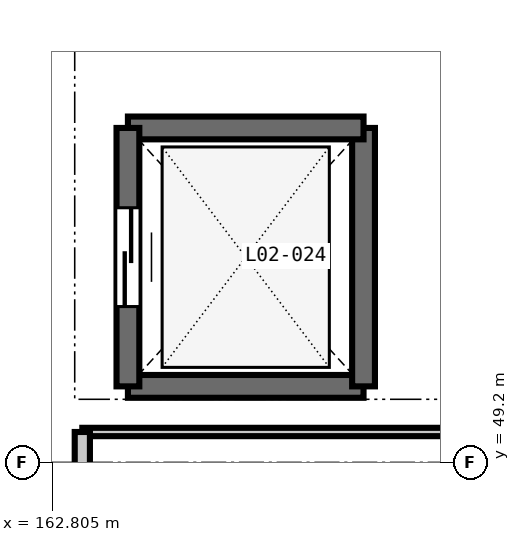
"""IFC4 building model, lengths in metres.
Left out: names, types, materials, properties, quantities, classifications, styles, units other than length and angle.
Written with IfcOpenShell. Run it as: python <this file> out.ifc"""

import sys

from ifc_helpers import new_model, si_unit, direction, frame, frame_2d, origin, place, context, subcontext, project, spatial, rectangle, extrude, element, fill, save


model = new_model("IFC4")
c1 = context("Model", 3, precision=1e-05, world=origin(), true_north=direction((0.0, 1.0)))
c2 = subcontext(c1, "Body", "Model", "MODEL_VIEW")
j1 = project(units=[si_unit("LENGTHUNIT", "METRE"), si_unit("PLANEANGLEUNIT", "RADIAN")], contexts=[c1])
p1 = place(None, origin())
s1 = spatial("IfcSite", under=j1, at=p1, CompositionType="ELEMENT")
p2 = place(p1, origin())
s2 = spatial("IfcBuilding", under=s1, at=p2, CompositionType="ELEMENT")
p3 = place(p2, frame((0.0, 0.0, 10.8)))
s3 = spatial("IfcBuildingStorey", under=s2, at=p3, CompositionType="ELEMENT", Elevation=10.8)
p4 = place(p3, frame((163.8, 50.2, 0.0), z_axis=(0.0, 0.0, 1.0), x_axis=(1.0, 0.0, 0.0)))
e1 = element("IfcWall", 1, at=p4, inside=s3, PredefinedType="SHEAR", context=c2, shape_type="SweptSolid", body=[
    extrude(rectangle(XDim=3.1, YDim=0.3, at=frame_2d((1.55, 0.0))), origin(), (0.0, 0.0, 1.0), 5.4),
])
p5 = place(p3, frame((166.9, 50.2, 0.0), z_axis=(0.0, 0.0, 1.0), x_axis=(0.0, 1.0, 0.0)))
e2 = element("IfcWall", 2, at=p5, inside=s3, PredefinedType="SHEAR", context=c2, shape_type="SweptSolid", body=[
    extrude(rectangle(XDim=3.4, YDim=0.3, at=frame_2d((1.7, 0.0))), origin(), (0.0, 0.0, 1.0), 5.4),
])
p6 = place(p3, frame((166.9, 53.6, 0.0), z_axis=(0.0, 0.0, 1.0), x_axis=(-1.0, 0.0, 0.0)))
e3 = element("IfcWall", 3, at=p6, inside=s3, PredefinedType="SHEAR", context=c2, shape_type="SweptSolid", body=[
    extrude(rectangle(XDim=3.1, YDim=0.3, at=frame_2d((1.55, 0.0))), origin(), (0.0, 0.0, 1.0), 5.4),
])
p7 = place(p3, frame((163.8, 53.6, 0.0), z_axis=(0.0, 0.0, 1.0), x_axis=(0.0, -1.0, 0.0)))
e4 = element("IfcWall", 4, at=p7, inside=s3, PredefinedType="SHEAR", context=c2, shape_type="SweptSolid", body=[
    extrude(rectangle(XDim=3.4, YDim=0.3, at=frame_2d((1.7, 0.0))), origin(), (0.0, 0.0, 1.0), 5.4),
])
p8 = place(p7, frame((1.05, 0.0, 0.0)))
e5 = element("IfcOpeningElement", 5, at=p8, cuts=e4, PredefinedType="OPENING", context=c2, shape_type="SweptSolid", body=[
    extrude(rectangle(XDim=1.3, YDim=2.2, at=frame_2d((0.65, 1.1))), frame((0.0, 0.16, 0.0), z_axis=(0.0, -1.0, 0.0), x_axis=(1.0, 0.0, 0.0)), (0.0, 0.0, 1.0), 0.32),
])
p9 = place(p3, frame((163.2, 49.6, 0.0), z_axis=(0.0, 0.0, 1.0), x_axis=(1.0, 0.0, 0.0)))
e6 = element("IfcWall", 6, at=p9, inside=s3, PredefinedType="PARTITIONING", context=c2, shape_type="SweptSolid", body=[
    extrude(rectangle(XDim=12.94, YDim=0.11, at=frame_2d((6.47, 0.0))), origin(), (0.0, 0.0, 1.0), 5.07),
])
p10 = place(p3, frame((163.2, 40.8, 0.0), z_axis=(0.0, 0.0, 1.0), x_axis=(0.0, 1.0, 0.0)))
e7 = element("IfcWall", 7, at=p10, inside=s3, PredefinedType="PARTITIONING", context=c2, shape_type="SweptSolid", body=[
    extrude(rectangle(XDim=8.8, YDim=0.2, at=frame_2d((4.4, 0.0))), origin(), (0.0, 0.0, 1.0), 5.07),
])
p11 = place(p10, frame((3.775, 0.0, 0.0)))
e8 = element("IfcOpeningElement", 8, at=p11, cuts=e7, PredefinedType="OPENING", context=c2, shape_type="SweptSolid", body=[
    extrude(rectangle(XDim=1.25, YDim=2.15, at=frame_2d((0.625, 1.075))), frame((0.0, 0.11, 0.0), z_axis=(0.0, -1.0, 0.0), x_axis=(1.0, 0.0, 0.0)), (0.0, 0.0, 1.0), 0.22),
])
p12 = place(p8, origin())
e9 = element("IfcDoor", 9, at=p12, inside=s3, OperationType="DOUBLE_DOOR_SLIDING", PredefinedType="DOOR", context=c2, shape_type="SweptSolid", body=[
    extrude(rectangle(XDim=1.3, YDim=2.2, at=frame_2d((0.65, 1.1))), frame((0.0, 0.025, 0.0), z_axis=(0.0, -1.0, 0.0), x_axis=(1.0, 0.0, 0.0)), (0.0, 0.0, 1.0), 0.05),
])
fill(e5, e9)
save(model, sys.argv[1])
